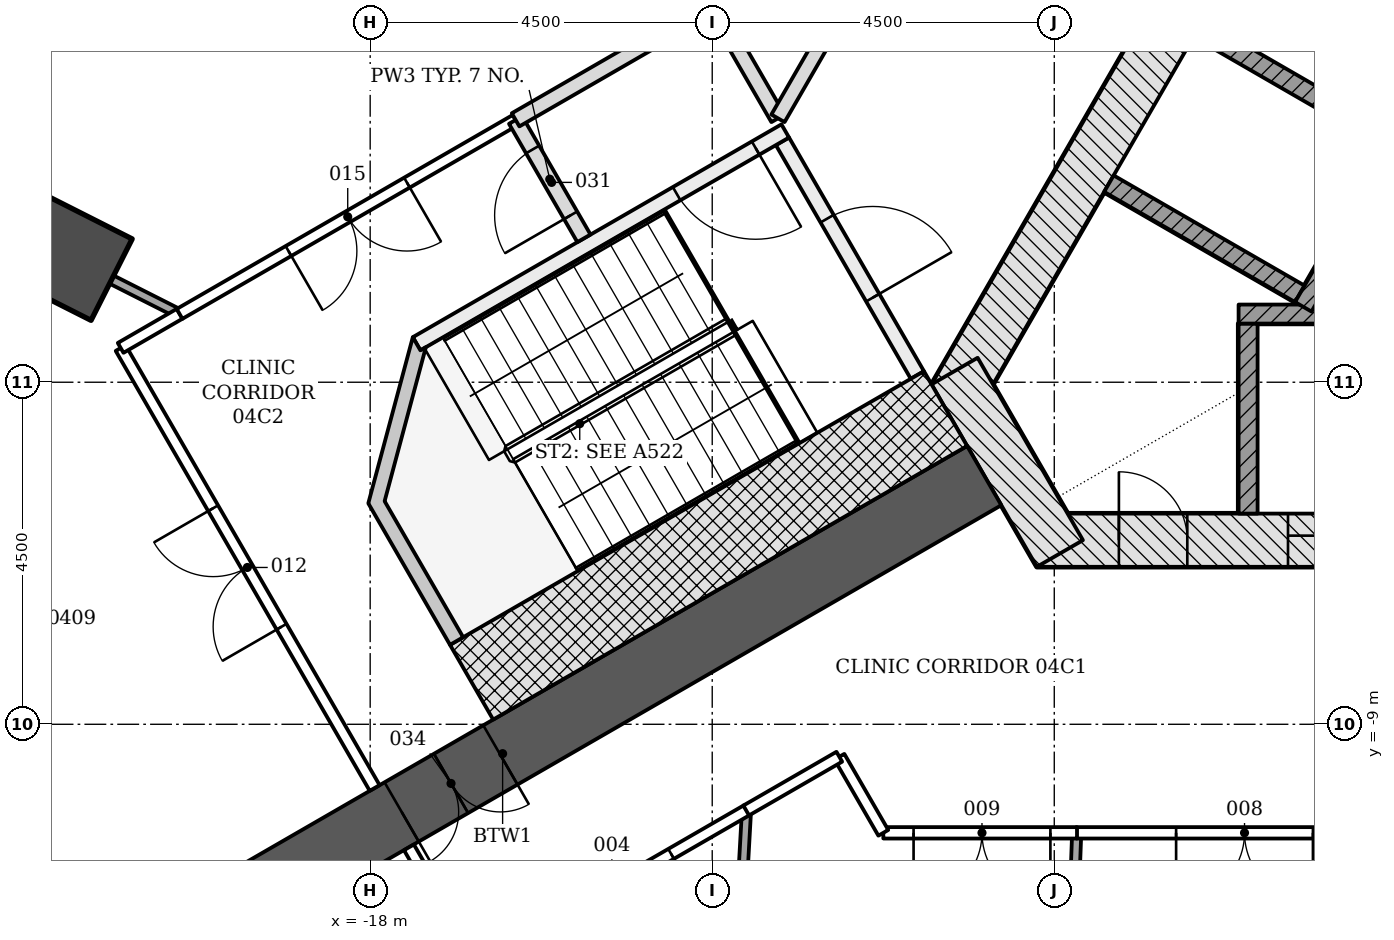
"""IFC4 building model, lengths in metres.
Left out: names, types, materials, properties, quantities, classifications, styles, units other than length and angle.
Written with IfcOpenShell. Run it as: python <this file> out.ifc"""

import sys

from ifc_helpers import new_model, si_unit, direction, frame, frame_2d, origin, origin_2d, place, context, subcontext, project, spatial, polyline, rectangle, outline, extrude, element, fill, save


model = new_model("IFC4")
c1 = context("Model", 3, precision=1e-05, world=origin(), true_north=direction((0.0, 1.0)))
c2 = subcontext(c1, "Body", "Model", "MODEL_VIEW")
j1 = project(units=[si_unit("LENGTHUNIT", "METRE"), si_unit("PLANEANGLEUNIT", "RADIAN")], contexts=[c1])
p1 = place(None, origin())
s1 = spatial("IfcSite", under=j1, at=p1, CompositionType="ELEMENT")
p2 = place(p1, origin())
s2 = spatial("IfcBuilding", under=s1, at=p2, CompositionType="ELEMENT")
p3 = place(p2, frame((0.0, 0.0, 19.5)))
s3 = spatial("IfcBuildingStorey", under=s2, at=p3, CompositionType="ELEMENT", Elevation=19.5)
p4 = place(p3, frame((-21.937, -2.88, -0.25), z_axis=(0.0, 0.0, 1.0), x_axis=(-0.89250065469, 0.451046096733, 0.0)))
e1 = element("IfcColumn", 1, at=p4, inside=s3, PredefinedType="COLUMN", context=c2, shape_type="SweptSolid", body=[
    extrude(rectangle(XDim=1.2, YDim=1.2, at=origin_2d()), origin(), (0.0, 0.0, 1.0), 4.55),
])
p5 = place(p3, frame((-9.229, -6.578, -0.25), z_axis=(0.0, 0.0, 1.0), x_axis=(1.0, 0.0, 0.0)))
e2 = element("IfcWall", 2, at=p5, inside=s3, PredefinedType="SHEAR", context=c2, shape_type="SweptSolid", body=[
    extrude(rectangle(XDim=18.458, YDim=0.7, at=frame_2d((9.229, 0.0))), origin(), (0.0, 0.0, 1.0), 4.55),
])
p6 = place(p5, frame((3.304, 0.0, 0.25)))
e3 = element("IfcOpeningElement", 3, at=p6, cuts=e2, PredefinedType="OPENING", context=c2, shape_type="SweptSolid", body=[
    extrude(rectangle(XDim=1.1, YDim=2.1, at=frame_2d((0.55, 1.05))), frame((0.0, 0.36, 0.0), z_axis=(0.0, -1.0, 0.0), x_axis=(1.0, 0.0, 0.0)), (0.0, 0.0, 1.0), 0.72),
])
p7 = place(p5, frame((5.454, 0.0, 0.25)))
e4 = element("IfcOpeningElement", 4, at=p7, cuts=e2, PredefinedType="OPENING", context=c2, shape_type="SweptSolid", body=[
    extrude(rectangle(XDim=1.1, YDim=2.1, at=frame_2d((0.55, 1.05))), frame((0.0, 0.36, 0.0), z_axis=(0.0, -1.0, 0.0), x_axis=(1.0, 0.0, 0.0)), (0.0, 0.0, 1.0), 0.72),
])
p8 = place(p5, frame((7.604, 0.0, 0.25)))
e5 = element("IfcOpeningElement", 5, at=p8, cuts=e2, PredefinedType="OPENING", context=c2, shape_type="SweptSolid", body=[
    extrude(rectangle(XDim=1.1, YDim=2.1, at=frame_2d((0.55, 1.05))), frame((0.0, 0.36, 0.0), z_axis=(0.0, -1.0, 0.0), x_axis=(1.0, 0.0, 0.0)), (0.0, 0.0, 1.0), 0.72),
])
p9 = place(p5, frame((9.754, 0.0, 0.25)))
e6 = element("IfcOpeningElement", 6, at=p9, cuts=e2, PredefinedType="OPENING", context=c2, shape_type="SweptSolid", body=[
    extrude(rectangle(XDim=1.1, YDim=2.1, at=frame_2d((0.55, 1.05))), frame((0.0, 0.36, 0.0), z_axis=(0.0, -1.0, 0.0), x_axis=(1.0, 0.0, 0.0)), (0.0, 0.0, 1.0), 0.72),
])
p10 = place(p5, frame((11.904, 0.0, 0.25)))
e7 = element("IfcOpeningElement", 7, at=p10, cuts=e2, PredefinedType="OPENING", context=c2, shape_type="SweptSolid", body=[
    extrude(rectangle(XDim=1.1, YDim=2.1, at=frame_2d((0.55, 1.05))), frame((0.0, 0.36, 0.0), z_axis=(0.0, -1.0, 0.0), x_axis=(1.0, 0.0, 0.0)), (0.0, 0.0, 1.0), 0.72),
])
p11 = place(p5, frame((14.054, 0.0, 0.25)))
e8 = element("IfcOpeningElement", 8, at=p11, cuts=e2, PredefinedType="OPENING", context=c2, shape_type="SweptSolid", body=[
    extrude(rectangle(XDim=1.1, YDim=2.1, at=frame_2d((0.55, 1.05))), frame((0.0, 0.36, 0.0), z_axis=(0.0, -1.0, 0.0), x_axis=(1.0, 0.0, 0.0)), (0.0, 0.0, 1.0), 0.72),
])
p12 = place(p5, frame((1.079, 0.0, 0.25)))
e9 = element("IfcOpeningElement", 9, at=p12, cuts=e2, PredefinedType="OPENING", context=c2, shape_type="SweptSolid", body=[
    extrude(rectangle(XDim=0.9, YDim=2.1, at=frame_2d((0.45, 1.05))), frame((0.0, 0.36, 0.0), z_axis=(0.0, -1.0, 0.0), x_axis=(1.0, 0.0, 0.0)), (0.0, 0.0, 1.0), 0.72),
])
p13 = place(p3, frame((-1.083, 11.281, -0.25), z_axis=(0.0, 0.0, 1.0), x_axis=(-0.500001446645, -0.866024568562, 0.0)))
e10 = element("IfcWall", 10, at=p13, inside=s3, PredefinedType="SHEAR", context=c2, shape_type="SweptSolid", body=[
    extrude(rectangle(XDim=18.458, YDim=0.7, at=frame_2d((9.229, 0.0))), origin(), (0.0, 0.0, 1.0), 4.55),
])
p14 = place(p13, frame((8.979, 0.0, 0.25)))
e11 = element("IfcOpeningElement", 11, at=p14, cuts=e10, PredefinedType="OPENING", context=c2, shape_type="SweptSolid", body=[
    extrude(rectangle(XDim=1.2, YDim=2.1, at=frame_2d((0.6, 1.05))), frame((0.0, 0.36, 0.0), z_axis=(0.0, -1.0, 0.0), x_axis=(1.0, 0.0, 0.0)), (0.0, 0.0, 1.0), 0.72),
])
p15 = place(p13, frame((11.029, 0.0, 0.25)))
e12 = element("IfcOpeningElement", 12, at=p15, cuts=e10, PredefinedType="OPENING", context=c2, shape_type="SweptSolid", body=[
    extrude(rectangle(XDim=1.2, YDim=2.1, at=frame_2d((0.6, 1.05))), frame((0.0, 0.36, 0.0), z_axis=(0.0, -1.0, 0.0), x_axis=(1.0, 0.0, 0.0)), (0.0, 0.0, 1.0), 0.72),
])
p16 = place(p3, frame((-10.311, -4.353, -0.25), z_axis=(0.0, 0.0, 1.0), x_axis=(0.500042739161, -0.866000726912, 0.0)))
e13 = element("IfcWall", 13, at=p16, inside=s3, PredefinedType="SHEAR", context=c2, shape_type="SweptSolid", body=[
    extrude(rectangle(XDim=2.771, YDim=0.7, at=frame_2d((1.386, 0.0))), origin(), (0.0, 0.0, 1.0), 4.55),
])
p17 = place(p3, frame((-9.922, -5.728, -0.25), z_axis=(0.0, 0.0, 1.0), x_axis=(-0.866028046028, -0.499995423472, 0.0)))
e14 = element("IfcWall", 14, at=p17, inside=s3, PredefinedType="SHEAR", context=c2, shape_type="SweptSolid", body=[
    extrude(rectangle(XDim=14.633, YDim=0.9, at=frame_2d((7.316, 0.0))), origin(), (0.0, 0.0, 1.0), 4.55),
])
p18 = place(p17, frame((7.35, 0.0, 0.25)))
e15 = element("IfcOpeningElement", 15, at=p18, cuts=e14, PredefinedType="OPENING", context=c2, shape_type="SweptSolid", body=[
    extrude(rectangle(XDim=1.5, YDim=2.1, at=frame_2d((0.75, 1.05))), frame((0.0, 0.46, 0.0), z_axis=(0.0, -1.0, 0.0), x_axis=(1.0, 0.0, 0.0)), (0.0, 0.0, 1.0), 0.92),
])
p19 = place(p3, frame((-6.45, -6.228, -0.25), z_axis=(0.0, 0.0, 1.0), x_axis=(0.0, 1.0, 0.0)))
e16 = element("IfcWall", 16, at=p19, inside=s3, PredefinedType="PARTITIONING", context=c2, shape_type="SweptSolid", body=[
    extrude(rectangle(XDim=2.5, YDim=0.25, at=frame_2d((1.25, 0.0))), origin(), (0.0, 0.0, 1.0), 4.55),
])
p20 = place(p3, frame((-6.575, -3.603, 0.0), z_axis=(0.0, 0.0, 1.0), x_axis=(1.0, 0.0, 0.0)))
e17 = element("IfcWall", 17, at=p20, inside=s3, PredefinedType="PARTITIONING", context=c2, shape_type="SweptSolid", body=[
    extrude(rectangle(XDim=13.15, YDim=0.25, at=frame_2d((6.575, 0.0))), origin(), (0.0, 0.0, 1.0), 4.3),
])
for number, where, z_axis, x_axis in (
    (18, (-7.106, 0.148, -0.25), (0.0, 0.0, 1.0), (0.866, -0.5, 0.0)),
    (19, (-8.281, -1.887, -0.25), (0.0, 0.0, 1.0), (0.866, -0.5, 0.0)),
):
    element("IfcWall", number, at=place(p3, frame(where, z_axis=z_axis, x_axis=x_axis)), inside=s3, PredefinedType="PARTITIONING", context=c2, shape_type="SweptSolid", body=[
        extrude(rectangle(XDim=2.9, YDim=0.25, at=frame_2d((1.45, 0.0))), origin(), (0.0, 0.0, 1.0), 4.55),
    ])
p21 = place(p3, frame((0.176, 6.711, 0.0), z_axis=(0.0, 0.0, 1.0), x_axis=(-0.500004227369, -0.866022963098, 0.0)))
e20 = element("IfcWall", 20, at=p21, inside=s3, PredefinedType="PARTITIONING", context=c2, shape_type="SweptSolid", body=[
    extrude(rectangle(XDim=11.8, YDim=0.25, at=frame_2d((5.9, 0.0))), origin(), (0.0, 0.0, 1.0), 4.3),
])
p22 = place(p3, frame((-12.576, -1.331, -0.25), z_axis=(0.0, 0.0, 1.0), x_axis=(0.499970499736, -0.8660424351, 0.0)))
e21 = element("IfcWall", 21, at=p22, inside=s3, PredefinedType="SHEAR", context=c2, shape_type="SweptSolid", body=[
    extrude(rectangle(XDim=3.55, YDim=0.2, at=frame_2d((1.775, 0.0))), origin(), (0.0, 0.0, 1.0), 4.55),
])
p23 = place(p22, frame((1.175, 0.0, 0.25)))
e22 = element("IfcOpeningElement", 22, at=p23, cuts=e21, PredefinedType="OPENING", context=c2, shape_type="SweptSolid", body=[
    extrude(rectangle(XDim=1.2, YDim=2.1, at=frame_2d((0.6, 1.05))), frame((0.0, 0.11, 0.0), z_axis=(0.0, -1.0, 0.0), x_axis=(1.0, 0.0, 0.0)), (0.0, 0.0, 1.0), 0.22),
])
p24 = place(p3, frame((-12.539, -1.194, -0.25), z_axis=(0.0, 0.0, 1.0), x_axis=(-0.866045472092, -0.499965239061, 0.0)))
e23 = element("IfcWall", 23, at=p24, inside=s3, PredefinedType="SHEAR", context=c2, shape_type="SweptSolid", body=[
    extrude(rectangle(XDim=5.6, YDim=0.2, at=frame_2d((2.8, 0.0))), origin(), (0.0, 0.0, 1.0), 4.55),
])
p25 = place(p24, frame((0.45, 0.0, 0.25)))
e24 = element("IfcOpeningElement", 24, at=p25, cuts=e23, PredefinedType="OPENING", context=c2, shape_type="SweptSolid", body=[
    extrude(rectangle(XDim=1.2, YDim=2.1, at=frame_2d((0.6, 1.05))), frame((0.0, 0.11, 0.0), z_axis=(0.0, -1.0, 0.0), x_axis=(1.0, 0.0, 0.0)), (0.0, 0.0, 1.0), 0.22),
])
p26 = place(p3, frame((-10.43, -4.847, -0.25), z_axis=(0.0, 0.0, 1.0), x_axis=(-0.866018442252, -0.500012057535, 0.0)))
e25 = element("IfcWall", 25, at=p26, inside=s3, PredefinedType="SHEAR", context=c2, shape_type="SweptSolid", body=[
    extrude(rectangle(XDim=7.2, YDim=1.136, at=frame_2d((3.6, 0.0))), origin(), (0.0, 0.0, 1.0), 4.55),
])
p27 = place(p3, frame((0.0, 0.0, -0.25)))
e26 = element("IfcWall", 26, at=p27, inside=s3, PredefinedType="SHEAR", context=c2, shape_type="SweptSolid", body=[
    extrude(outline(polyline([(-17.439, -3.907), (-18.025, -6.093), (-16.95, -7.955), (-16.777, -7.855), (-17.81, -6.065), (-17.267, -4.039), (-17.339, -4.081), (-17.339, -4.081), (-17.339, -4.081), (-17.339, -4.081), (-17.339, -4.081), (-17.339, -4.081), (-17.339, -4.081), (-17.339, -4.081), (-17.339, -4.081), (-17.339, -4.081), (-17.339, -4.081), (-17.339, -4.081), (-17.339, -4.081), (-17.339, -4.081), (-17.339, -4.081), (-17.339, -4.081), (-17.339, -4.081), (-17.439, -3.907)])), origin(), (0.0, 0.0, 1.0), 4.55),
])
p28 = place(p3, frame((-13.429, -16.96, 0.0), z_axis=(0.0, 0.0, 1.0), x_axis=(0.055551088657, 0.998455846069, 0.0)))
e27 = element("IfcWall", 27, at=p28, inside=s3, PredefinedType="PARTITIONING", context=c2, shape_type="SweptSolid", body=[
    extrude(rectangle(XDim=6.838, YDim=0.12, at=frame_2d((3.419, 0.0))), origin(), (0.0, 0.0, 1.0), 3.767),
])
p29 = place(p3, frame((-13.045, -10.13, 0.0), z_axis=(0.0, 0.0, 1.0), x_axis=(-0.866035577775, -0.499982377718, 0.0)))
e28 = element("IfcWall", 28, at=p29, inside=s3, PredefinedType="PARTITIONING", context=c2, shape_type="SweptSolid", body=[
    extrude(rectangle(XDim=4.093, YDim=0.15, at=frame_2d((2.046, 0.0))), origin(), (0.0, 0.0, 1.0), 3.767),
])
p30 = place(p29, frame((1.15, 0.0, 0.0)))
e29 = element("IfcOpeningElement", 29, at=p30, cuts=e28, PredefinedType="OPENING", context=c2, shape_type="SweptSolid", body=[
    extrude(rectangle(XDim=1.8, YDim=2.1, at=frame_2d((0.9, 1.05))), frame((0.0, 0.085, 0.0), z_axis=(0.0, -1.0, 0.0), x_axis=(1.0, 0.0, 0.0)), (0.0, 0.0, 1.0), 0.17),
])
p31 = place(p3, frame((-16.591, -12.176, 0.0), z_axis=(0.0, 0.0, 1.0), x_axis=(-0.499965372359, 0.866045395139, 0.0)))
e30 = element("IfcWall", 30, at=p31, inside=s3, PredefinedType="PARTITIONING", context=c2, shape_type="SweptSolid", body=[
    extrude(rectangle(XDim=1.798, YDim=0.15, at=frame_2d((0.899, 0.0))), origin(), (0.0, 0.0, 1.0), 3.843),
])
p32 = place(p3, frame((-8.705, -10.429, 0.0), z_axis=(0.0, 0.0, 1.0), x_axis=(-0.037170289837, -0.999308945999, 0.0)))
e31 = element("IfcWall", 31, at=p32, inside=s3, PredefinedType="PARTITIONING", context=c2, shape_type="SweptSolid", body=[
    extrude(rectangle(XDim=7.343, YDim=0.12, at=frame_2d((3.672, 0.0))), origin(), (0.0, 0.0, 1.0), 3.18),
])
p33 = place(p3, frame((-4.347, -10.428, 0.0), z_axis=(0.0, 0.0, 1.0), x_axis=(-1.0, 0.0, 0.0)))
e32 = element("IfcWall", 32, at=p33, inside=s3, PredefinedType="PARTITIONING", context=c2, shape_type="SweptSolid", body=[
    extrude(rectangle(XDim=4.362, YDim=0.15, at=frame_2d((2.181, 0.0))), origin(), (0.0, 0.0, 1.0), 3.698),
])
p34 = place(p33, frame((1.25, 0.0, 0.0)))
e33 = element("IfcOpeningElement", 33, at=p34, cuts=e32, PredefinedType="OPENING", context=c2, shape_type="SweptSolid", body=[
    extrude(rectangle(XDim=1.8, YDim=2.1, at=frame_2d((0.9, 1.05))), frame((0.0, 0.085, 0.0), z_axis=(0.0, -1.0, 0.0), x_axis=(1.0, 0.0, 0.0)), (0.0, 0.0, 1.0), 0.17),
])
p35 = place(p3, frame((-8.701, -10.428, 0.0), z_axis=(0.0, 0.0, 1.0), x_axis=(-1.0, 0.0, 0.0)))
e34 = element("IfcWall", 34, at=p35, inside=s3, PredefinedType="PARTITIONING", context=c2, shape_type="SweptSolid", body=[
    extrude(rectangle(XDim=2.548, YDim=0.15, at=frame_2d((1.274, 0.0))), origin(), (0.0, 0.0, 1.0), 3.698),
])
p36 = place(p35, frame((0.35, 0.0, 0.0)))
e35 = element("IfcOpeningElement", 35, at=p36, cuts=e34, PredefinedType="OPENING", context=c2, shape_type="SweptSolid", body=[
    extrude(rectangle(XDim=1.8, YDim=2.1, at=frame_2d((0.9, 1.05))), frame((0.0, 0.085, 0.0), z_axis=(0.0, -1.0, 0.0), x_axis=(1.0, 0.0, 0.0)), (0.0, 0.0, 1.0), 0.17),
])
p37 = place(p3, frame((-11.249, -10.428, 0.0), z_axis=(0.0, 0.0, 1.0), x_axis=(-0.499978438088, 0.866037852202, 0.0)))
e36 = element("IfcWall", 36, at=p37, inside=s3, PredefinedType="PARTITIONING", context=c2, shape_type="SweptSolid", body=[
    extrude(rectangle(XDim=1.156, YDim=0.15, at=frame_2d((0.578, 0.0))), origin(), (0.0, 0.0, 1.0), 4.3),
])
p38 = place(p3, frame((-11.828, -9.427, 0.0), z_axis=(0.0, 0.0, 1.0), x_axis=(-0.866110865696, -0.499851946404, 0.0)))
e37 = element("IfcWall", 37, at=p38, inside=s3, PredefinedType="PARTITIONING", context=c2, shape_type="SweptSolid", body=[
    extrude(rectangle(XDim=1.415, YDim=0.15, at=frame_2d((0.707, 0.0))), origin(), (0.0, 0.0, 1.0), 3.767),
])
p39 = place(p3, frame((-17.941, -9.838, 0.0), z_axis=(0.0, 0.0, 1.0), x_axis=(-0.500048140185, 0.865997608252, 0.0)))
e38 = element("IfcWall", 38, at=p39, inside=s3, PredefinedType="PARTITIONING", context=c2, shape_type="SweptSolid", body=[
    extrude(rectangle(XDim=6.683, YDim=0.15, at=frame_2d((3.342, 0.0))), origin(), (0.0, 0.0, 1.0), 3.843),
])
p40 = place(p39, frame((2.45, 0.0, 0.0)))
e39 = element("IfcOpeningElement", 39, at=p40, cuts=e38, PredefinedType="OPENING", context=c2, shape_type="SweptSolid", body=[
    extrude(rectangle(XDim=1.8, YDim=2.1, at=frame_2d((0.9, 1.05))), frame((0.0, 0.085, 0.0), z_axis=(0.0, -1.0, 0.0), x_axis=(1.0, 0.0, 0.0)), (0.0, 0.0, 1.0), 0.17),
])
p41 = place(p3, frame((-21.283, -4.048, 0.0), z_axis=(0.0, 0.0, 1.0), x_axis=(0.865804825377, 0.500381858538, 0.0)))
e40 = element("IfcWall", 40, at=p41, inside=s3, PredefinedType="PARTITIONING", context=c2, shape_type="SweptSolid", body=[
    extrude(rectangle(XDim=0.897, YDim=0.15, at=frame_2d((0.449, 0.0))), origin(), (0.0, 0.0, 1.0), 3.894),
])
p42 = place(p3, frame((-20.509, -3.601, 0.0), z_axis=(0.0, 0.0, 1.0), x_axis=(-0.892316605155, 0.451410097544, 0.0)))
e41 = element("IfcWall", 41, at=p42, inside=s3, PredefinedType="PARTITIONING", context=c2, shape_type="SweptSolid", body=[
    extrude(rectangle(XDim=1.0, YDim=0.12, at=frame_2d((0.5, 0.0))), origin(), (0.0, 0.0, 1.0), 3.894),
])
p43 = place(p3, frame((-16.087, -1.049, 0.0), z_axis=(0.0, 0.0, 1.0), x_axis=(-0.866071706002, -0.49991979363, 0.0)))
e42 = element("IfcWall", 42, at=p43, inside=s3, PredefinedType="PARTITIONING", context=c2, shape_type="SweptSolid", body=[
    extrude(rectangle(XDim=5.105, YDim=0.15, at=frame_2d((2.552, 0.0))), origin(), (0.0, 0.0, 1.0), 3.894),
])
p44 = place(p43, frame((1.65, 0.0, 0.0)))
e43 = element("IfcOpeningElement", 43, at=p44, cuts=e42, PredefinedType="OPENING", context=c2, shape_type="SweptSolid", body=[
    extrude(rectangle(XDim=1.8, YDim=2.1, at=frame_2d((0.9, 1.05))), frame((0.0, 0.085, 0.0), z_axis=(0.0, -1.0, 0.0), x_axis=(1.0, 0.0, 0.0)), (0.0, 0.0, 1.0), 0.17),
])
p45 = place(p3, frame((-15.188, -2.607, 0.0), z_axis=(0.0, 0.0, 1.0), x_axis=(-0.500024172624, 0.866011447264, 0.0)))
e44 = element("IfcWall", 44, at=p45, inside=s3, PredefinedType="PARTITIONING", context=c2, shape_type="SweptSolid", body=[
    extrude(rectangle(XDim=1.798, YDim=0.2, at=frame_2d((0.899, 0.0))), origin(), (0.0, 0.0, 1.0), 4.3),
])
p46 = place(p45, frame((0.35, 0.0, 0.0)))
e45 = element("IfcOpeningElement", 45, at=p46, cuts=e44, PredefinedType="OPENING", context=c2, shape_type="SweptSolid", body=[
    extrude(rectangle(XDim=1.0, YDim=2.1, at=frame_2d((0.5, 1.05))), frame((0.0, 0.11, 0.0), z_axis=(0.0, -1.0, 0.0), x_axis=(1.0, 0.0, 0.0)), (0.0, 0.0, 1.0), 0.22),
])
p47 = place(p3, frame((-16.087, -1.048, 0.0), z_axis=(0.0, 0.0, 1.0), x_axis=(0.865988915629, 0.500063194015, 0.0)))
e46 = element("IfcWall", 46, at=p47, inside=s3, PredefinedType="PARTITIONING", context=c2, shape_type="SweptSolid", body=[
    extrude(rectangle(XDim=2.998, YDim=0.2, at=frame_2d((1.499, 0.0))), origin(), (0.0, 0.0, 1.0), 3.843),
])
p48 = place(p3, frame((-13.489, 0.451, 0.0), z_axis=(0.0, 0.0, 1.0), x_axis=(0.500044178772, -0.865999895656, 0.0)))
e47 = element("IfcWall", 47, at=p48, inside=s3, PredefinedType="PARTITIONING", context=c2, shape_type="SweptSolid", body=[
    extrude(rectangle(XDim=1.708, YDim=0.2, at=frame_2d((0.854, 0.0))), origin(), (0.0, 0.0, 1.0), 4.3),
])
p49 = place(p3, frame((-12.635, -1.028, 0.0), z_axis=(0.0, 0.0, 1.0), x_axis=(0.50005725472, 0.865992345233, 0.0)))
e48 = element("IfcWall", 48, at=p49, inside=s3, PredefinedType="PARTITIONING", context=c2, shape_type="SweptSolid", body=[
    extrude(rectangle(XDim=2.862, YDim=0.2, at=frame_2d((1.431, 0.0))), origin(), (0.0, 0.0, 1.0), 3.698),
])
p50 = place(p6, origin())
e49 = element("IfcDoor", 49, at=p50, inside=s3, OperationType="DOUBLE_DOOR_SLIDING", PredefinedType="DOOR", context=c2, shape_type="SweptSolid", body=[
    extrude(rectangle(XDim=1.1, YDim=2.1, at=frame_2d((0.55, 1.05))), frame((0.0, 0.025, 0.0), z_axis=(0.0, -1.0, 0.0), x_axis=(1.0, 0.0, 0.0)), (0.0, 0.0, 1.0), 0.05),
])
fill(e3, e49)
p51 = place(p12, origin())
e50 = element("IfcDoor", 50, at=p51, inside=s3, OperationType="SINGLE_SWING_LEFT", PredefinedType="DOOR", context=c2, shape_type="SweptSolid", body=[
    extrude(rectangle(XDim=0.9, YDim=2.1, at=frame_2d((0.45, 1.05))), frame((0.0, 0.075, 0.0), z_axis=(0.0, -1.0, 0.0), x_axis=(1.0, 0.0, 0.0)), (0.0, 0.0, 1.0), 0.15),
])
fill(e9, e50)
p52 = place(p23, origin())
e51 = element("IfcDoor", 51, at=p52, inside=s3, OperationType="SINGLE_SWING_RIGHT", PredefinedType="DOOR", context=c2, shape_type="SweptSolid", body=[
    extrude(rectangle(XDim=1.2, YDim=2.1, at=frame_2d((0.6, 1.05))), frame((0.0, 0.025, 0.0), z_axis=(0.0, -1.0, 0.0), x_axis=(1.0, 0.0, 0.0)), (0.0, 0.0, 1.0), 0.05),
])
fill(e22, e51)
p53 = place(p25, origin())
e52 = element("IfcDoor", 52, at=p53, inside=s3, OperationType="SINGLE_SWING_LEFT", PredefinedType="DOOR", context=c2, shape_type="SweptSolid", body=[
    extrude(rectangle(XDim=1.2, YDim=2.1, at=frame_2d((0.6, 1.05))), frame((0.0, 0.025, 0.0), z_axis=(0.0, -1.0, 0.0), x_axis=(1.0, 0.0, 0.0)), (0.0, 0.0, 1.0), 0.05),
])
fill(e24, e52)
p54 = place(p30, origin())
e53 = element("IfcDoor", 53, at=p54, inside=s3, OperationType="DOUBLE_DOOR_SINGLE_SWING", PredefinedType="DOOR", context=c2, shape_type="SweptSolid", body=[
    extrude(rectangle(XDim=1.8, YDim=2.1, at=frame_2d((0.9, 1.05))), frame((0.0, 0.025, 0.0), z_axis=(0.0, -1.0, 0.0), x_axis=(1.0, 0.0, 0.0)), (0.0, 0.0, 1.0), 0.05),
])
fill(e29, e53)
p55 = place(p34, origin())
e54 = element("IfcDoor", 54, at=p55, inside=s3, OperationType="DOUBLE_DOOR_SINGLE_SWING", PredefinedType="DOOR", context=c2, shape_type="SweptSolid", body=[
    extrude(rectangle(XDim=1.8, YDim=2.1, at=frame_2d((0.9, 1.05))), frame((0.0, 0.025, 0.0), z_axis=(0.0, -1.0, 0.0), x_axis=(1.0, 0.0, 0.0)), (0.0, 0.0, 1.0), 0.05),
])
fill(e33, e54)
p56 = place(p36, origin())
e55 = element("IfcDoor", 55, at=p56, inside=s3, OperationType="DOUBLE_DOOR_SINGLE_SWING", PredefinedType="DOOR", context=c2, shape_type="SweptSolid", body=[
    extrude(rectangle(XDim=1.8, YDim=2.1, at=frame_2d((0.9, 1.05))), frame((0.0, 0.025, 0.0), z_axis=(0.0, -1.0, 0.0), x_axis=(1.0, 0.0, 0.0)), (0.0, 0.0, 1.0), 0.05),
])
fill(e35, e55)
p57 = place(p40, origin())
e56 = element("IfcDoor", 56, at=p57, inside=s3, OperationType="DOUBLE_DOOR_SINGLE_SWING", PredefinedType="DOOR", context=c2, shape_type="SweptSolid", body=[
    extrude(rectangle(XDim=1.8, YDim=2.1, at=frame_2d((0.9, 1.05))), frame((0.0, 0.025, 0.0), z_axis=(0.0, -1.0, 0.0), x_axis=(1.0, 0.0, 0.0)), (0.0, 0.0, 1.0), 0.05),
])
fill(e39, e56)
p58 = place(p44, origin())
e57 = element("IfcDoor", 57, at=p58, inside=s3, OperationType="DOUBLE_DOOR_SINGLE_SWING", PredefinedType="DOOR", context=c2, shape_type="SweptSolid", body=[
    extrude(rectangle(XDim=1.8, YDim=2.1, at=frame_2d((0.9, 1.05))), frame((0.0, 0.025, 0.0), z_axis=(0.0, -1.0, 0.0), x_axis=(1.0, 0.0, 0.0)), (0.0, 0.0, 1.0), 0.05),
])
fill(e43, e57)
p59 = place(p46, origin())
e58 = element("IfcDoor", 58, at=p59, inside=s3, OperationType="SINGLE_SWING_LEFT", PredefinedType="DOOR", context=c2, shape_type="SweptSolid", body=[
    extrude(rectangle(XDim=1.0, YDim=2.1, at=frame_2d((0.5, 1.05))), frame((0.0, 0.025, 0.0), z_axis=(0.0, -1.0, 0.0), x_axis=(1.0, 0.0, 0.0)), (0.0, 0.0, 1.0), 0.05),
])
fill(e45, e58)
p60 = place(p18, origin())
e59 = element("IfcDoor", 59, at=p60, inside=s3, OperationType="DOUBLE_DOOR_SINGLE_SWING", PredefinedType="DOOR", context=c2, shape_type="SweptSolid", body=[
    extrude(rectangle(XDim=1.5, YDim=2.1, at=frame_2d((0.75, 1.05))), frame((0.0, 0.025, 0.0), z_axis=(0.0, -1.0, 0.0), x_axis=(1.0, 0.0, 0.0)), (0.0, 0.0, 1.0), 0.05),
])
fill(e15, e59)
save(model, sys.argv[1])
